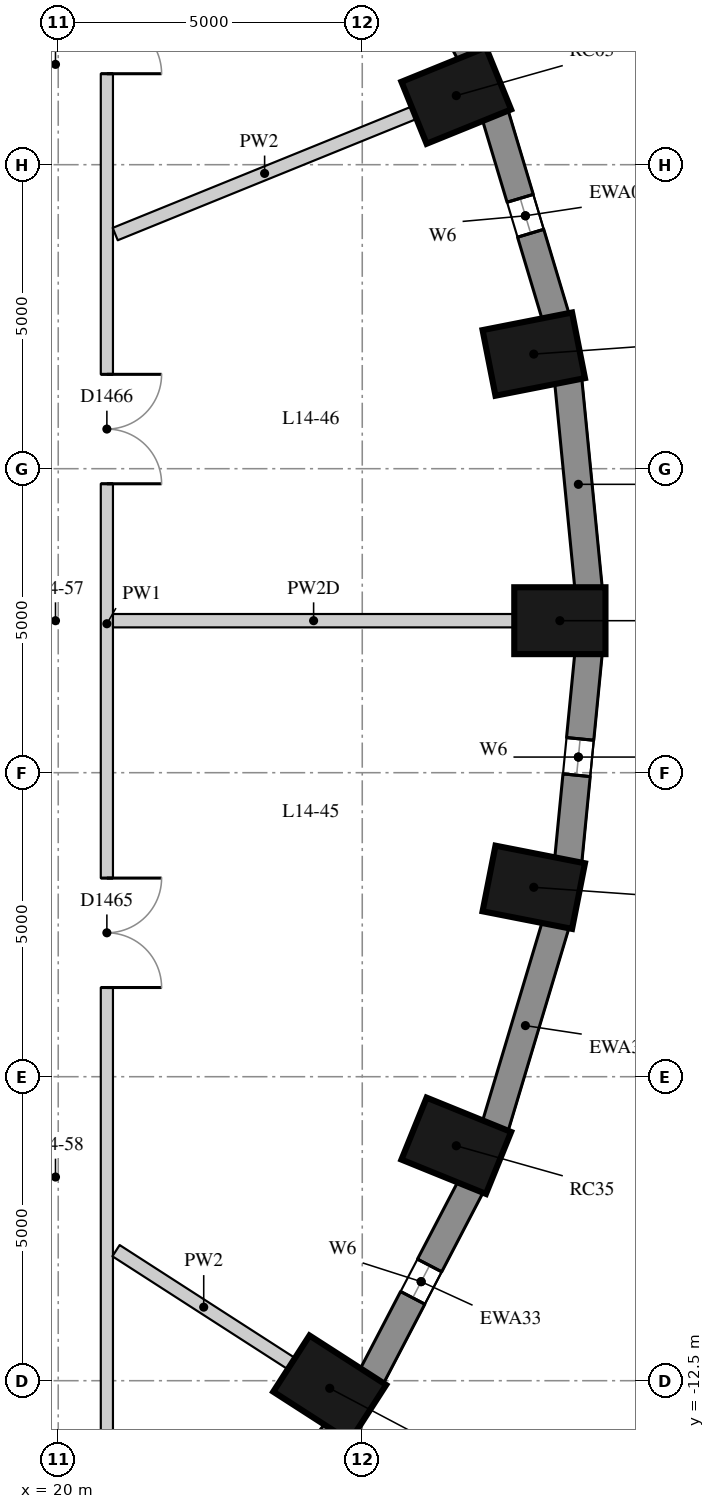
"""IFC4 building model, lengths in metres.
Left out: names, types, materials, properties, quantities, classifications, styles, units other than length and angle.
Written with IfcOpenShell. Run it as: python <this file> out.ifc"""

import sys

from ifc_helpers import new_model, si_unit, direction, frame, frame_2d, origin, origin_2d, place, context, subcontext, project, spatial, rectangle, extrude, element, fill, save


model = new_model("IFC4")
c1 = context("Model", 3, precision=1e-05, world=origin(), true_north=direction((0.0, 1.0)))
c2 = subcontext(c1, "Body", "Model", "MODEL_VIEW")
j1 = project(units=[si_unit("LENGTHUNIT", "METRE"), si_unit("PLANEANGLEUNIT", "RADIAN")], contexts=[c1])
p1 = place(None, origin())
s1 = spatial("IfcSite", under=j1, at=p1, CompositionType="ELEMENT")
p2 = place(p1, origin())
s2 = spatial("IfcBuilding", under=s1, at=p2, CompositionType="ELEMENT")
p3 = place(p2, frame((0.0, 0.0, 54.7)))
s3 = spatial("IfcBuildingStorey", under=s2, at=p3, CompositionType="ELEMENT", Elevation=54.7)
for number, where, z_axis, x_axis in (
    (1, (28.25, 0.0, 0.0), (0.0, 0.0, 1.0), (1.0, 0.0, 0.0)),
    (2, (27.821, 4.385, 0.0), (0.0, 0.0, 1.0), (0.981, 0.193, 0.0)),
    (3, (26.546, 8.636, 0.0), (0.0, 0.0, 1.0), (0.927, 0.376, 0.0)),
    (4, (24.465, -12.625, 0.0), (0.0, 0.0, 1.0), (0.841, -0.541, 0.0)),
    (5, (26.546, -8.636, 0.0), (0.0, 0.0, 1.0), (0.927, -0.376, 0.0)),
    (6, (27.821, -4.385, 0.0), (0.0, 0.0, 1.0), (0.981, -0.193, 0.0)),
):
    element("IfcColumn", number, at=place(p3, frame(where, z_axis=z_axis, x_axis=x_axis)), inside=s3, PredefinedType="COLUMN", context=c2, shape_type="SweptSolid", body=[
        extrude(rectangle(XDim=1.5, YDim=1.1, at=origin_2d()), origin(), (0.0, 0.0, 1.0), 3.3),
    ])
p4 = place(p3, frame((28.722, 0.53, 0.0), z_axis=(0.0, 0.0, 1.0), x_axis=(-0.097389581596, 0.995246336038, 0.0)))
e7 = element("IfcWall", 7, at=p4, inside=s3, PredefinedType="SOLIDWALL", context=c2, shape_type="SweptSolid", body=[
    extrude(rectangle(XDim=3.442, YDim=0.45, at=frame_2d((1.721, 0.0))), origin(), (0.0, 0.0, 1.0), 3.02),
])
p5 = place(p3, frame((28.182, 4.996, 0.0), z_axis=(0.0, 0.0, 1.0), x_axis=(-0.287064133733, 0.957911364963, 0.0)))
e8 = element("IfcWall", 8, at=p5, inside=s3, PredefinedType="SOLIDWALL", context=c2, shape_type="SweptSolid", body=[
    extrude(rectangle(XDim=3.473, YDim=0.45, at=frame_2d((1.737, 0.0))), origin(), (0.0, 0.0, 1.0), 3.02),
])
p6 = place(p5, frame((1.437, 0.0, 0.4)))
e9 = element("IfcOpeningElement", 9, at=p6, cuts=e8, PredefinedType="OPENING", context=c2, shape_type="SweptSolid", body=[
    extrude(rectangle(XDim=0.6, YDim=1.75, at=frame_2d((0.3, 0.875))), frame((0.0, 0.235, 0.0), z_axis=(0.0, -1.0, 0.0), x_axis=(1.0, 0.0, 0.0)), (0.0, 0.0, 1.0), 0.47),
])
p7 = place(p3, frame((26.786, 9.305, 0.0), z_axis=(0.0, 0.0, 1.0), x_axis=(-0.462492775226, 0.886623050041, 0.0)))
e10 = element("IfcWall", 10, at=p7, inside=s3, PredefinedType="SOLIDWALL", context=c2, shape_type="SweptSolid", body=[
    extrude(rectangle(XDim=3.532, YDim=0.45, at=frame_2d((1.766, 0.0))), origin(), (0.0, 0.0, 1.0), 3.02),
])
p8 = place(p3, frame((22.352, -16.17, 0.0), z_axis=(0.0, 0.0, 1.0), x_axis=(0.616661975264, 0.787228053529, 0.0)))
e11 = element("IfcWall", 11, at=p8, inside=s3, PredefinedType="SOLIDWALL", context=c2, shape_type="SweptSolid", body=[
    extrude(rectangle(XDim=3.61, YDim=0.45, at=frame_2d((1.805, 0.0))), origin(), (0.0, 0.0, 1.0), 3.02),
])
p9 = place(p3, frame((25.152, -12.437, 0.0), z_axis=(0.0, 0.0, 1.0), x_axis=(0.462492775226, 0.886623050041, 0.0)))
e12 = element("IfcWall", 12, at=p9, inside=s3, PredefinedType="SOLIDWALL", context=c2, shape_type="SweptSolid", body=[
    extrude(rectangle(XDim=3.532, YDim=0.45, at=frame_2d((1.766, 0.0))), origin(), (0.0, 0.0, 1.0), 3.02),
])
p10 = place(p9, frame((1.466, 0.0, 0.4)))
e13 = element("IfcOpeningElement", 13, at=p10, cuts=e12, PredefinedType="OPENING", context=c2, shape_type="SweptSolid", body=[
    extrude(rectangle(XDim=0.6, YDim=1.75, at=frame_2d((0.3, 0.875))), frame((0.0, 0.235, 0.0), z_axis=(0.0, -1.0, 0.0), x_axis=(1.0, 0.0, 0.0)), (0.0, 0.0, 1.0), 0.47),
])
p11 = place(p3, frame((27.185, -8.323, 0.0), z_axis=(0.0, 0.0, 1.0), x_axis=(0.287064133733, 0.957911364963, 0.0)))
e14 = element("IfcWall", 14, at=p11, inside=s3, PredefinedType="SOLIDWALL", context=c2, shape_type="SweptSolid", body=[
    extrude(rectangle(XDim=3.473, YDim=0.45, at=frame_2d((1.737, 0.0))), origin(), (0.0, 0.0, 1.0), 3.02),
])
p12 = place(p3, frame((28.387, -3.956, 0.0), z_axis=(0.0, 0.0, 1.0), x_axis=(0.097389581596, 0.995246336038, 0.0)))
e15 = element("IfcWall", 15, at=p12, inside=s3, PredefinedType="SOLIDWALL", context=c2, shape_type="SweptSolid", body=[
    extrude(rectangle(XDim=3.442, YDim=0.45, at=frame_2d((1.721, 0.0))), origin(), (0.0, 0.0, 1.0), 3.02),
])
p13 = place(p12, frame((1.421, 0.0, 0.4)))
e16 = element("IfcOpeningElement", 16, at=p13, cuts=e15, PredefinedType="OPENING", context=c2, shape_type="SweptSolid", body=[
    extrude(rectangle(XDim=0.6, YDim=1.75, at=frame_2d((0.3, 0.875))), frame((0.0, 0.235, 0.0), z_axis=(0.0, -1.0, 0.0), x_axis=(1.0, 0.0, 0.0)), (0.0, 0.0, 1.0), 0.47),
])
p14 = place(p3, frame((20.8, 13.5, 0.0), z_axis=(0.0, 0.0, 1.0), x_axis=(0.0, -1.0, 0.0)))
e17 = element("IfcWall", 17, at=p14, inside=s3, PredefinedType="PARTITIONING", context=c2, shape_type="SweptSolid", body=[
    extrude(rectangle(XDim=27.1, YDim=0.2, at=frame_2d((13.55, 0.0))), origin(), (0.0, 0.0, 1.0), 3.02),
])
p15 = place(p14, frame((17.733, 0.0, 0.0)))
e18 = element("IfcOpeningElement", 18, at=p15, cuts=e17, PredefinedType="OPENING", context=c2, shape_type="SweptSolid", body=[
    extrude(rectangle(XDim=1.8, YDim=2.1, at=frame_2d((0.9, 1.05))), frame((0.0, 0.11, 0.0), z_axis=(0.0, -1.0, 0.0), x_axis=(1.0, 0.0, 0.0)), (0.0, 0.0, 1.0), 0.22),
])
p16 = place(p14, frame((9.448, 0.0, 0.0)))
e19 = element("IfcOpeningElement", 19, at=p16, cuts=e17, PredefinedType="OPENING", context=c2, shape_type="SweptSolid", body=[
    extrude(rectangle(XDim=1.8, YDim=2.1, at=frame_2d((0.9, 1.05))), frame((0.0, 0.11, 0.0), z_axis=(0.0, -1.0, 0.0), x_axis=(1.0, 0.0, 0.0)), (0.0, 0.0, 1.0), 0.22),
])
p17 = place(p14, frame((2.704, 0.0, 0.0)))
e20 = element("IfcOpeningElement", 20, at=p17, cuts=e17, PredefinedType="OPENING", context=c2, shape_type="SweptSolid", body=[
    extrude(rectangle(XDim=1.8, YDim=2.1, at=frame_2d((0.9, 1.05))), frame((0.0, 0.11, 0.0), z_axis=(0.0, -1.0, 0.0), x_axis=(1.0, 0.0, 0.0)), (0.0, 0.0, 1.0), 0.22),
])
p18 = place(p3, frame((27.5, 0.0, 0.0), z_axis=(0.0, 0.0, 1.0), x_axis=(-1.0, 0.0, 0.0)))
e21 = element("IfcWall", 21, at=p18, inside=s3, PredefinedType="PARTITIONING", context=c2, shape_type="SweptSolid", body=[
    extrude(rectangle(XDim=6.6, YDim=0.22, at=frame_2d((3.3, 0.0))), origin(), (0.0, 0.0, 1.0), 2.47),
])
p19 = place(p3, frame((25.851, 8.354, 0.0), z_axis=(0.0, 0.0, 1.0), x_axis=(-0.926546814299, -0.376179479653, 0.0)))
e22 = element("IfcWall", 22, at=p19, inside=s3, PredefinedType="PARTITIONING", context=c2, shape_type="SweptSolid", body=[
    extrude(rectangle(XDim=5.304, YDim=0.22, at=frame_2d((2.652, 0.0))), origin(), (0.0, 0.0, 1.0), 3.02),
])
p20 = place(p3, frame((23.835, -12.219, 0.0), z_axis=(0.0, 0.0, 1.0), x_axis=(-0.840694872373, 0.541509124176, 0.0)))
e23 = element("IfcWall", 23, at=p20, inside=s3, PredefinedType="PARTITIONING", context=c2, shape_type="SweptSolid", body=[
    extrude(rectangle(XDim=3.43, YDim=0.22, at=frame_2d((1.715, 0.0))), origin(), (0.0, 0.0, 1.0), 3.02),
])
p21 = place(p6, origin())
e24 = element("IfcWindow", 24, at=p21, inside=s3, PartitioningType="SINGLE_PANEL", PredefinedType="WINDOW", context=c2, shape_type="SweptSolid", body=[
    extrude(rectangle(XDim=0.6, YDim=1.75, at=frame_2d((0.3, 0.875))), frame((0.0, 0.035, 0.0), z_axis=(0.0, -1.0, 0.0), x_axis=(1.0, 0.0, 0.0)), (0.0, 0.0, 1.0), 0.06),
])
fill(e9, e24)
p22 = place(p10, origin())
e25 = element("IfcWindow", 25, at=p22, inside=s3, PartitioningType="SINGLE_PANEL", PredefinedType="WINDOW", context=c2, shape_type="SweptSolid", body=[
    extrude(rectangle(XDim=0.6, YDim=1.75, at=frame_2d((0.3, 0.875))), frame((0.0, 0.035, 0.0), z_axis=(0.0, -1.0, 0.0), x_axis=(1.0, 0.0, 0.0)), (0.0, 0.0, 1.0), 0.06),
])
fill(e13, e25)
p23 = place(p13, origin())
e26 = element("IfcWindow", 26, at=p23, inside=s3, PartitioningType="SINGLE_PANEL", PredefinedType="WINDOW", context=c2, shape_type="SweptSolid", body=[
    extrude(rectangle(XDim=0.6, YDim=1.75, at=frame_2d((0.3, 0.875))), frame((0.0, 0.035, 0.0), z_axis=(0.0, -1.0, 0.0), x_axis=(1.0, 0.0, 0.0)), (0.0, 0.0, 1.0), 0.06),
])
fill(e16, e26)
p24 = place(p15, origin())
e27 = element("IfcDoor", 27, at=p24, inside=s3, OperationType="DOUBLE_DOOR_SINGLE_SWING", PredefinedType="DOOR", context=c2, shape_type="SweptSolid", body=[
    extrude(rectangle(XDim=1.8, YDim=2.1, at=frame_2d((0.9, 1.05))), frame((0.0, 0.025, 0.0), z_axis=(0.0, -1.0, 0.0), x_axis=(1.0, 0.0, 0.0)), (0.0, 0.0, 1.0), 0.05),
])
fill(e18, e27)
p25 = place(p16, origin())
e28 = element("IfcDoor", 28, at=p25, inside=s3, OperationType="DOUBLE_DOOR_SINGLE_SWING", PredefinedType="DOOR", context=c2, shape_type="SweptSolid", body=[
    extrude(rectangle(XDim=1.8, YDim=2.1, at=frame_2d((0.9, 1.05))), frame((0.0, 0.025, 0.0), z_axis=(0.0, -1.0, 0.0), x_axis=(1.0, 0.0, 0.0)), (0.0, 0.0, 1.0), 0.05),
])
fill(e19, e28)
p26 = place(p17, origin())
e29 = element("IfcDoor", 29, at=p26, inside=s3, OperationType="DOUBLE_DOOR_SINGLE_SWING", PredefinedType="DOOR", context=c2, shape_type="SweptSolid", body=[
    extrude(rectangle(XDim=1.8, YDim=2.1, at=frame_2d((0.9, 1.05))), frame((0.0, 0.025, 0.0), z_axis=(0.0, -1.0, 0.0), x_axis=(1.0, 0.0, 0.0)), (0.0, 0.0, 1.0), 0.05),
])
fill(e20, e29)
save(model, sys.argv[1])
